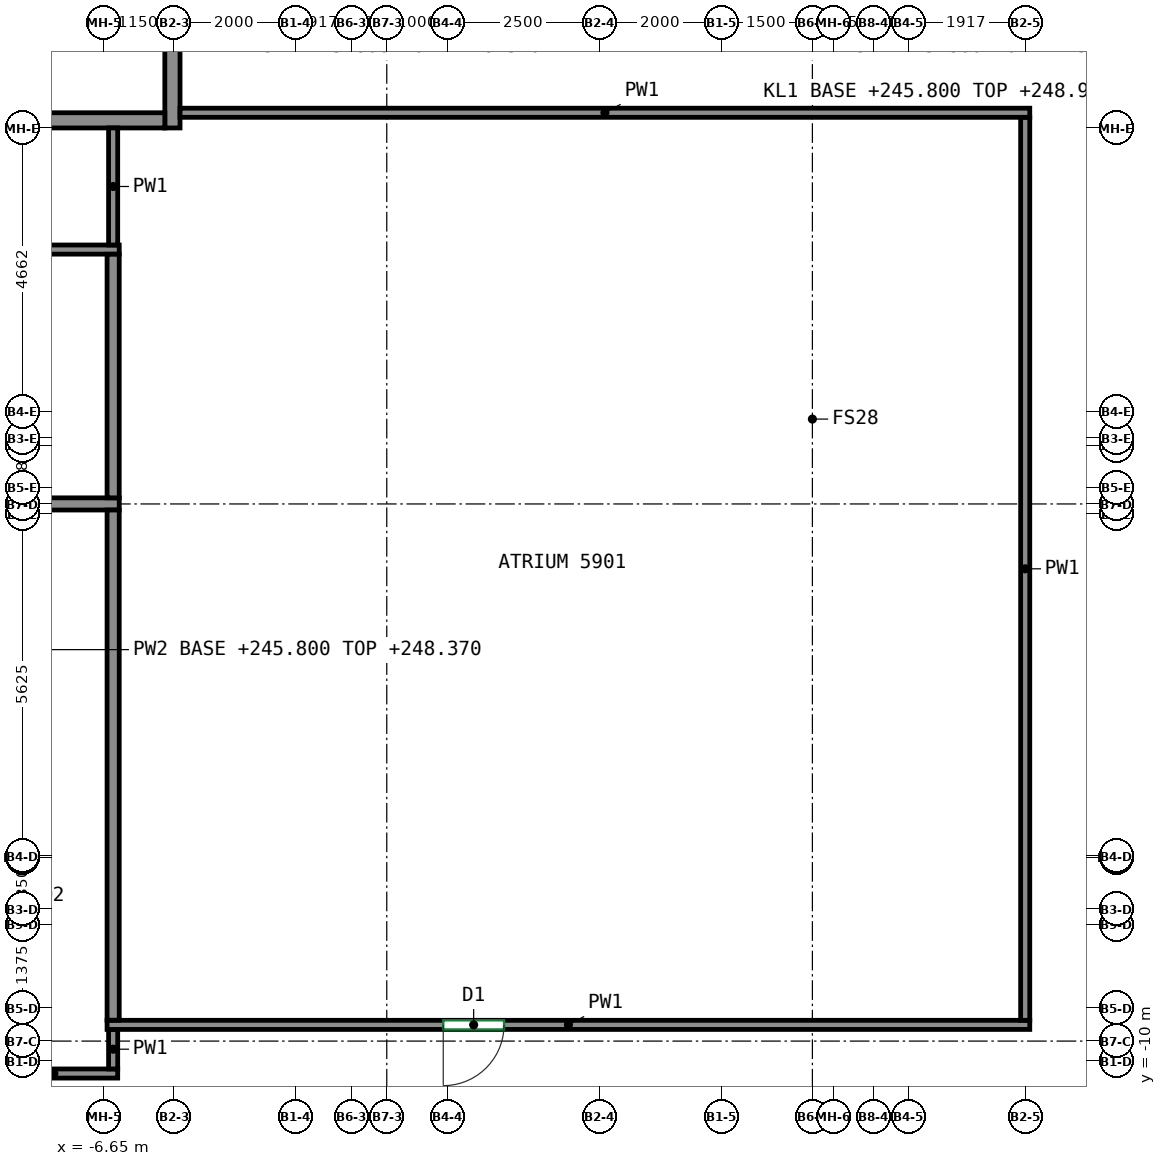
"""IFC4 building model, lengths in metres.
Left out: names, types, materials, properties, quantities, classifications, styles, units other than length and angle.
Written with IfcOpenShell. Run it as: python <this file> out.ifc"""

import sys

from ifc_helpers import new_model, si_unit, direction, frame, frame_2d, origin, place, context, subcontext, project, spatial, rectangle, extrude, source, transform, mapped, element, fill, save


model = new_model("IFC4")
c1 = context("Model", 3, precision=1e-05, world=origin(), true_north=direction((0.0, 1.0)))
c2 = subcontext(c1, "Body", "Model", "MODEL_VIEW")
j1 = project(units=[si_unit("LENGTHUNIT", "METRE"), si_unit("PLANEANGLEUNIT", "RADIAN")], contexts=[c1])
p1 = place(None, origin())
s1 = spatial("IfcSite", under=j1, at=p1, CompositionType="ELEMENT")
p2 = place(p1, origin())
s2 = spatial("IfcBuilding", under=s1, at=p2, CompositionType="ELEMENT")
p3 = place(p2, frame((0.0, 0.0, 245.8)))
s3 = spatial("IfcBuildingStorey", under=s2, at=p3, CompositionType="ELEMENT", Elevation=245.8)
m1 = source(origin(), c2, "Body", "SweptSolid", [
    extrude(rectangle(XDim=2.65, YDim=0.25, at=frame_2d((1.325, 0.0))), origin(), (0.0, 0.0, 1.0), 2.57),
])
p4 = place(p3, frame((-5.525, 5.35, 0.0), z_axis=(0.0, 0.0, 1.0), x_axis=(0.0, 1.0, 0.0)))
e1 = element("IfcWall", 1, at=p4, inside=s3, PredefinedType="PARTITIONING", context=c2, shape_type="MappedRepresentation", body=[
    mapped(m1, transform((0.0, 0.0, 0.0))),
])
m2 = source(origin(), c2, "Body", "SweptSolid", [
    extrude(rectangle(XDim=5.36, YDim=0.25, at=frame_2d((2.68, 0.0))), origin(), (0.0, 0.0, 1.0), 3.12),
])
p5 = place(p3, frame((-11.01, 5.475, 0.0), z_axis=(0.0, 0.0, 1.0), x_axis=(1.0, 0.0, 0.0)))
e2 = element("IfcWall", 2, at=p5, inside=s3, PredefinedType="PARTITIONING", context=c2, shape_type="MappedRepresentation", body=[
    mapped(m2, transform((0.0, 0.0, 0.0))),
])
p6 = place(p5, frame((2.28, 0.0, 0.0)))
e3 = element("IfcOpeningElement", 3, at=p6, cuts=e2, PredefinedType="OPENING", context=c2, shape_type="SweptSolid", body=[
    extrude(rectangle(XDim=0.8, YDim=2.0, at=frame_2d((0.4, 1.0))), frame((0.0, 0.135, 0.0), z_axis=(0.0, -1.0, 0.0), x_axis=(1.0, 0.0, 0.0)), (0.0, 0.0, 1.0), 0.27),
])
p7 = place(p3, frame((-10.546, 3.35, 0.0), z_axis=(0.0, 0.0, 1.0), x_axis=(1.0, 0.0, 0.0)))
e4 = element("IfcWall", 4, at=p7, inside=s3, PredefinedType="PARTITIONING", context=c2, shape_type="SweptSolid", body=[
    extrude(rectangle(XDim=4.146, YDim=0.15, at=frame_2d((2.073, 0.0))), origin(), (0.0, 0.0, 1.0), 3.12),
])
p8 = place(p3, frame((-8.525, -10.2, 0.0), z_axis=(0.0, 0.0, 1.0), x_axis=(1.0, 0.0, 0.0)))
e5 = element("IfcWall", 5, at=p8, inside=s3, PredefinedType="PARTITIONING", context=c2, shape_type="SweptSolid", body=[
    extrude(rectangle(XDim=2.1, YDim=0.15, at=frame_2d((1.05, 0.0))), origin(), (0.0, 0.0, 1.0), 3.12),
])
p9 = place(p3, frame((-6.5, -10.125, 0.0), z_axis=(0.0, 0.0, 1.0), x_axis=(0.0, 1.0, 0.0)))
e6 = element("IfcWall", 6, at=p9, inside=s3, PredefinedType="PARTITIONING", context=c2, shape_type="SweptSolid", body=[
    extrude(rectangle(XDim=0.65, YDim=0.15, at=frame_2d((0.325, 0.0))), origin(), (0.0, 0.0, 1.0), 3.12),
])
p10 = place(p3, frame((-6.5, 3.425, 0.0), z_axis=(0.0, 0.0, 1.0), x_axis=(0.0, 1.0, 0.0)))
e7 = element("IfcWall", 7, at=p10, inside=s3, PredefinedType="PARTITIONING", context=c2, shape_type="SweptSolid", body=[
    extrude(rectangle(XDim=1.925, YDim=0.15, at=frame_2d((0.962, 0.0))), origin(), (0.0, 0.0, 1.0), 3.12),
])
p11 = place(p3, frame((8.575, -9.4, 0.0), z_axis=(0.0, 0.0, 1.0), x_axis=(-1.0, 0.0, 0.0)))
e8 = element("IfcWall", 8, at=p11, inside=s3, PredefinedType="PARTITIONING", context=c2, shape_type="SweptSolid", body=[
    extrude(rectangle(XDim=15.175, YDim=0.15, at=frame_2d((7.587, 0.0))), origin(), (0.0, 0.0, 1.0), 3.12),
])
p12 = place(p11, frame((8.646, 0.0, 0.0)))
e9 = element("IfcOpeningElement", 9, at=p12, cuts=e8, PredefinedType="OPENING", context=c2, shape_type="SweptSolid", body=[
    extrude(rectangle(XDim=1.0, YDim=2.1, at=frame_2d((0.5, 1.05))), frame((0.0, 0.085, 0.0), z_axis=(0.0, -1.0, 0.0), x_axis=(1.0, 0.0, 0.0)), (0.0, 0.0, 1.0), 0.17),
])
p13 = place(p3, frame((8.5, 5.525, 0.0), z_axis=(0.0, 0.0, 1.0), x_axis=(0.0, -1.0, 0.0)))
e10 = element("IfcWall", 10, at=p13, inside=s3, PredefinedType="PARTITIONING", context=c2, shape_type="SweptSolid", body=[
    extrude(rectangle(XDim=14.85, YDim=0.15, at=frame_2d((7.425, 0.0))), origin(), (0.0, 0.0, 1.0), 3.12),
])
p14 = place(p3, frame((-5.4, 5.6, 0.0), z_axis=(0.0, 0.0, 1.0), x_axis=(1.0, 0.0, 0.0)))
e11 = element("IfcWall", 11, at=p14, inside=s3, PredefinedType="PARTITIONING", context=c2, shape_type="SweptSolid", body=[
    extrude(rectangle(XDim=13.975, YDim=0.15, at=frame_2d((6.987, 0.0))), origin(), (0.0, 0.0, 1.0), 3.12),
])
p15 = place(p3, frame((-8.525, -0.833, 0.0), z_axis=(0.0, 0.0, 1.0), x_axis=(1.0, 0.0, 0.0)))
e12 = element("IfcWall", 12, at=p15, inside=s3, PredefinedType="PARTITIONING", context=c2, shape_type="SweptSolid", body=[
    extrude(rectangle(XDim=2.125, YDim=0.2, at=frame_2d((1.062, 0.0))), origin(), (0.0, 0.0, 1.0), 3.12),
])
p16 = place(p3, frame((-6.5, -0.733, 0.0), z_axis=(0.0, 0.0, 1.0), x_axis=(0.0, 1.0, 0.0)))
e13 = element("IfcWall", 13, at=p16, inside=s3, PredefinedType="PARTITIONING", context=c2, shape_type="SweptSolid", body=[
    extrude(rectangle(XDim=4.006, YDim=0.2, at=frame_2d((2.003, 0.0))), origin(), (0.0, 0.0, 1.0), 3.12),
])
p17 = place(p3, frame((-6.5, -9.323, 0.0), z_axis=(0.0, 0.0, 1.0), x_axis=(0.0, 1.0, 0.0)))
e14 = element("IfcWall", 14, at=p17, inside=s3, PredefinedType="PARTITIONING", context=c2, shape_type="SweptSolid", body=[
    extrude(rectangle(XDim=8.39, YDim=0.2, at=frame_2d((4.195, 0.0))), origin(), (0.0, 0.0, 1.0), 3.12),
])
p18 = place(p12, origin())
e15 = element("IfcDoor", 15, at=p18, inside=s3, OperationType="SINGLE_SWING_RIGHT", PredefinedType="DOOR", context=c2, shape_type="SweptSolid", body=[
    extrude(rectangle(XDim=1.0, YDim=2.1, at=frame_2d((0.5, 1.05))), frame((0.0, 0.025, 0.0), z_axis=(0.0, -1.0, 0.0), x_axis=(1.0, 0.0, 0.0)), (0.0, 0.0, 1.0), 0.05),
])
fill(e9, e15)
save(model, sys.argv[1])
